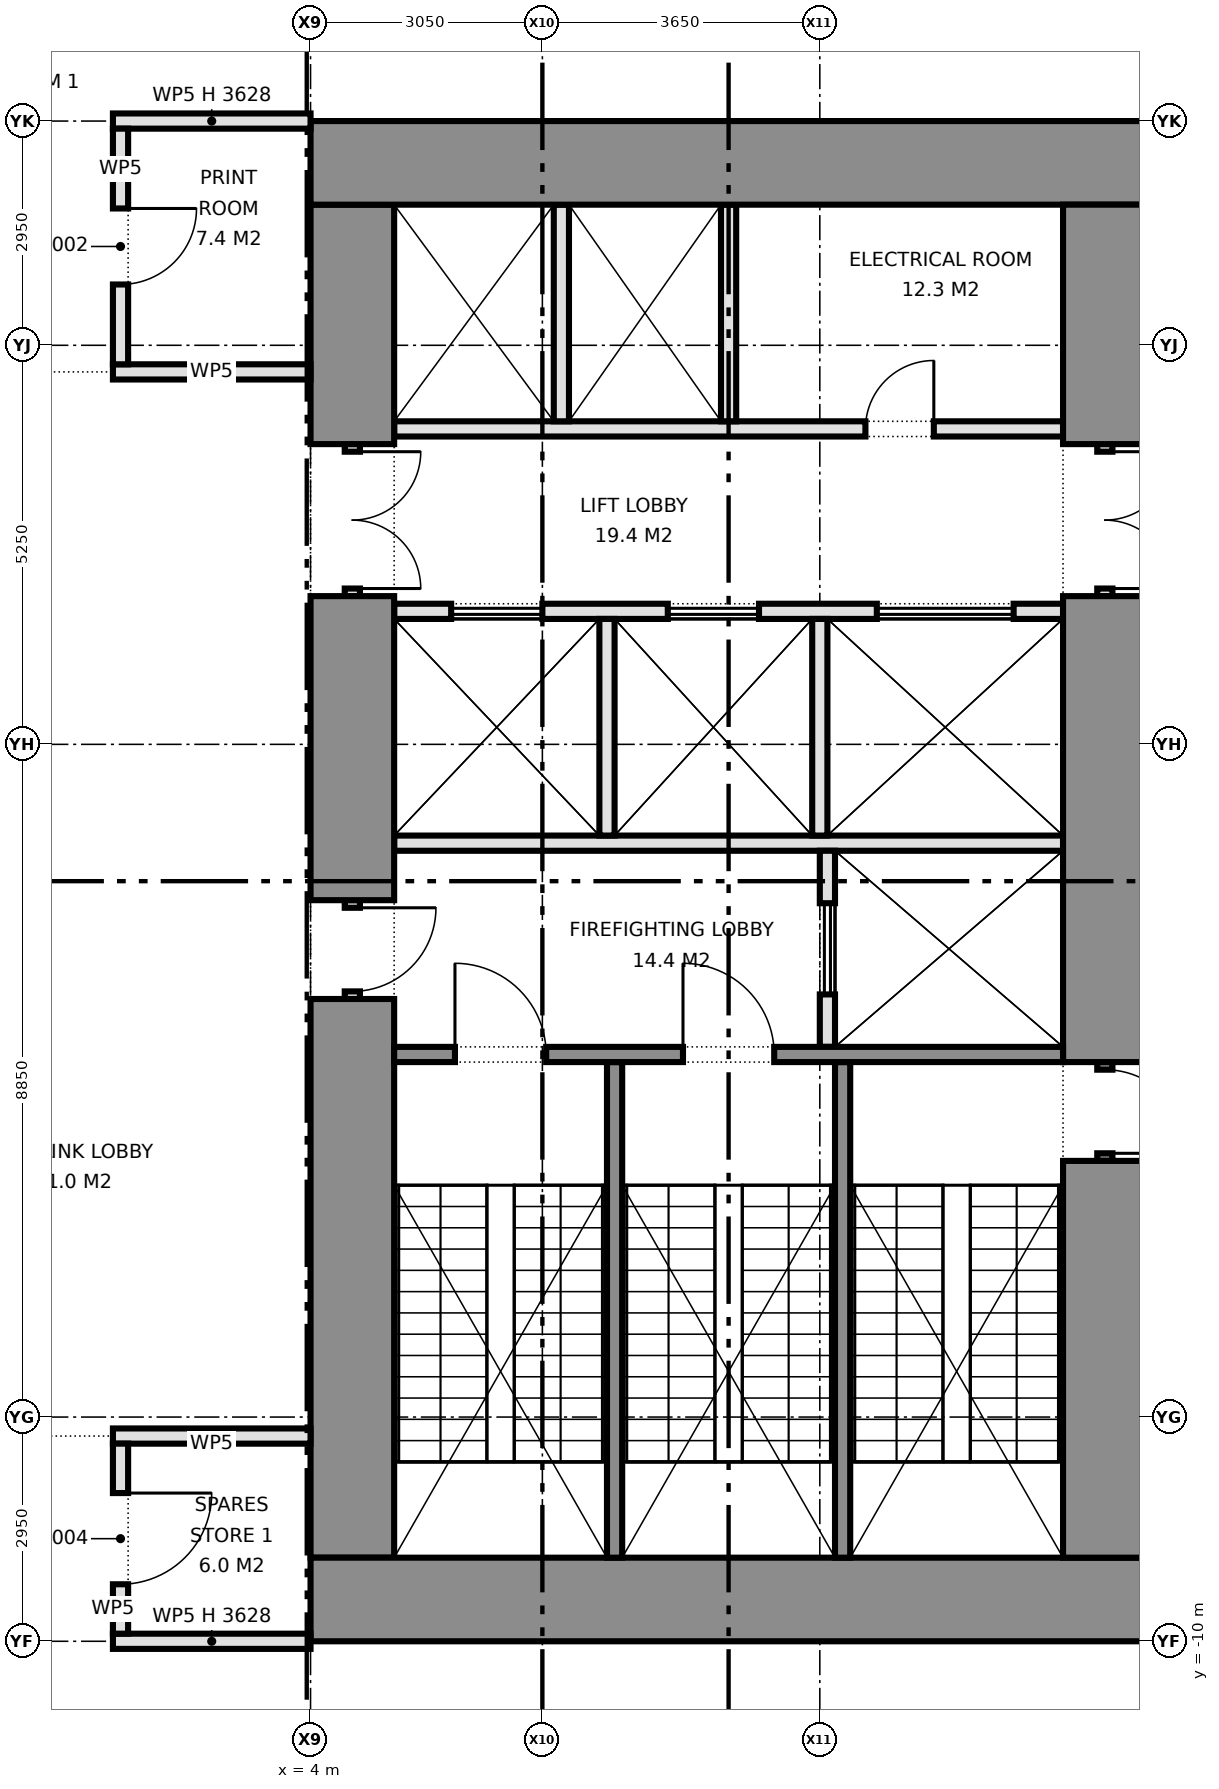
"""IFC4 building model, lengths in metres.
Left out: names, types, materials, properties, quantities, classifications, styles, units other than length and angle.
Written with IfcOpenShell. Run it as: python <this file> out.ifc"""

import sys

from ifc_helpers import new_model, si_unit, direction, frame, frame_2d, origin, place, context, subcontext, project, spatial, rectangle, extrude, element, fill, save


model = new_model("IFC4")
c1 = context("Model", 3, precision=1e-05, world=origin(), true_north=direction((0.0, 1.0)))
c2 = subcontext(c1, "Body", "Model", "MODEL_VIEW")
j1 = project(units=[si_unit("LENGTHUNIT", "METRE"), si_unit("PLANEANGLEUNIT", "RADIAN")], contexts=[c1])
p1 = place(None, origin())
s1 = spatial("IfcSite", under=j1, at=p1, CompositionType="ELEMENT")
p2 = place(p1, origin())
s2 = spatial("IfcBuilding", under=s1, at=p2, CompositionType="ELEMENT")
p3 = place(p2, frame((0.0, 0.0, 54.5)))
s3 = spatial("IfcBuildingStorey", under=s2, at=p3, CompositionType="ELEMENT", Elevation=54.5)
for number, where, z_axis, x_axis in (
    (1, (15.0, 9.45, 0.0), (0.0, 0.0, 1.0), (-1.0, 0.0, 0.0)),
    (2, (15.0, -9.45, 0.0), (0.0, 0.0, 1.0), (-1.0, 0.0, 0.0)),
):
    element("IfcWall", number, at=place(p3, frame(where, z_axis=z_axis, x_axis=x_axis)), inside=s3, PredefinedType="SHEAR", context=c2, shape_type="SweptSolid", body=[
        extrude(rectangle(XDim=11.0, YDim=1.1, at=frame_2d((5.5, 0.0))), origin(), (0.0, 0.0, 1.0), 4.575),
    ])
p4 = place(p3, frame((14.45, 8.9, 0.0), z_axis=(0.0, 0.0, 1.0), x_axis=(0.0, -1.0, 0.0)))
e3 = element("IfcWall", 3, at=p4, inside=s3, PredefinedType="SHEAR", context=c2, shape_type="SweptSolid", body=[
    extrude(rectangle(XDim=3.15, YDim=1.1, at=frame_2d((1.575, 0.0))), origin(), (0.0, 0.0, 1.0), 4.575),
])
p5 = place(p3, frame((14.45, 5.75, 0.0), z_axis=(0.0, 0.0, 1.0), x_axis=(0.0, -1.0, 0.0)))
e4 = element("IfcWall", 4, at=p5, inside=s3, PredefinedType="PARTITIONING", context=c2, shape_type="SweptSolid", body=[
    extrude(rectangle(XDim=2.0, YDim=0.2, at=frame_2d((1.0, 0.0))), origin(), (0.0, 0.0, 1.0), 2.4),
])
p6 = place(p5, frame((0.1, 0.0, 0.0)))
e5 = element("IfcOpeningElement", 5, at=p6, cuts=e4, PredefinedType="OPENING", context=c2, shape_type="SweptSolid", body=[
    extrude(rectangle(XDim=1.8, YDim=2.1, at=frame_2d((0.9, 1.05))), frame((0.0, 0.11, 0.0), z_axis=(0.0, -1.0, 0.0), x_axis=(1.0, 0.0, 0.0)), (0.0, 0.0, 1.0), 0.22),
])
p7 = place(p3, frame((14.45, 3.75, 0.0), z_axis=(0.0, 0.0, 1.0), x_axis=(0.0, -1.0, 0.0)))
e6 = element("IfcWall", 6, at=p7, inside=s3, PredefinedType="SHEAR", context=c2, shape_type="SweptSolid", body=[
    extrude(rectangle(XDim=6.13, YDim=1.1, at=frame_2d((3.065, 0.0))), origin(), (0.0, 0.0, 1.0), 4.575),
])
p8 = place(p3, frame((14.45, -2.38, 0.0), z_axis=(0.0, 0.0, 1.0), x_axis=(0.0, -1.0, 0.0)))
e7 = element("IfcWall", 7, at=p8, inside=s3, PredefinedType="SHEAR", context=c2, shape_type="SweptSolid", body=[
    extrude(rectangle(XDim=1.3, YDim=0.2, at=frame_2d((0.65, 0.0))), origin(), (0.0, 0.0, 1.0), 2.4),
])
p9 = place(p8, frame((0.1, 0.0, 0.0)))
e8 = element("IfcOpeningElement", 8, at=p9, cuts=e7, PredefinedType="OPENING", context=c2, shape_type="SweptSolid", body=[
    extrude(rectangle(XDim=1.1, YDim=2.1, at=frame_2d((0.55, 1.05))), frame((0.0, 0.11, 0.0), z_axis=(0.0, -1.0, 0.0), x_axis=(1.0, 0.0, 0.0)), (0.0, 0.0, 1.0), 0.22),
])
p10 = place(p3, frame((14.45, -3.68, 0.0), z_axis=(0.0, 0.0, 1.0), x_axis=(0.0, -1.0, 0.0)))
e9 = element("IfcWall", 9, at=p10, inside=s3, PredefinedType="SHEAR", context=c2, shape_type="SweptSolid", body=[
    extrude(rectangle(XDim=5.22, YDim=1.1, at=frame_2d((2.61, 0.0))), origin(), (0.0, 0.0, 1.0), 4.575),
])
p11 = place(p3, frame((4.55, 8.9, 0.0), z_axis=(0.0, 0.0, 1.0), x_axis=(0.0, -1.0, 0.0)))
e10 = element("IfcWall", 10, at=p11, inside=s3, PredefinedType="SHEAR", context=c2, shape_type="SweptSolid", body=[
    extrude(rectangle(XDim=3.15, YDim=1.1, at=frame_2d((1.575, 0.0))), origin(), (0.0, 0.0, 1.0), 4.575),
])
p12 = place(p3, frame((4.55, 5.75, 0.0), z_axis=(0.0, 0.0, 1.0), x_axis=(0.0, -1.0, 0.0)))
e11 = element("IfcWall", 11, at=p12, inside=s3, PredefinedType="PARTITIONING", context=c2, shape_type="SweptSolid", body=[
    extrude(rectangle(XDim=2.0, YDim=0.2, at=frame_2d((1.0, 0.0))), origin(), (0.0, 0.0, 1.0), 2.4),
])
p13 = place(p12, frame((0.1, 0.0, 0.0)))
e12 = element("IfcOpeningElement", 12, at=p13, cuts=e11, PredefinedType="OPENING", context=c2, shape_type="SweptSolid", body=[
    extrude(rectangle(XDim=1.8, YDim=2.1, at=frame_2d((0.9, 1.05))), frame((0.0, 0.11, 0.0), z_axis=(0.0, -1.0, 0.0), x_axis=(1.0, 0.0, 0.0)), (0.0, 0.0, 1.0), 0.22),
])
p14 = place(p3, frame((4.55, 3.75, 0.0), z_axis=(0.0, 0.0, 1.0), x_axis=(0.0, -1.0, 0.0)))
e13 = element("IfcWall", 13, at=p14, inside=s3, PredefinedType="SHEAR", context=c2, shape_type="SweptSolid", body=[
    extrude(rectangle(XDim=4.0, YDim=1.1, at=frame_2d((2.0, 0.0))), origin(), (0.0, 0.0, 1.0), 4.575),
])
p15 = place(p3, frame((4.55, -0.25, 0.0), z_axis=(0.0, 0.0, 1.0), x_axis=(0.0, -1.0, 0.0)))
e14 = element("IfcWall", 14, at=p15, inside=s3, PredefinedType="PARTITIONING", context=c2, shape_type="SweptSolid", body=[
    extrude(rectangle(XDim=1.3, YDim=0.2, at=frame_2d((0.65, 0.0))), origin(), (0.0, 0.0, 1.0), 2.4),
])
p16 = place(p15, frame((0.1, 0.0, 0.0)))
e15 = element("IfcOpeningElement", 15, at=p16, cuts=e14, PredefinedType="OPENING", context=c2, shape_type="SweptSolid", body=[
    extrude(rectangle(XDim=1.1, YDim=2.1, at=frame_2d((0.55, 1.05))), frame((0.0, 0.11, 0.0), z_axis=(0.0, -1.0, 0.0), x_axis=(1.0, 0.0, 0.0)), (0.0, 0.0, 1.0), 0.22),
])
p17 = place(p3, frame((4.55, -1.55, 0.0), z_axis=(0.0, 0.0, 1.0), x_axis=(0.0, -1.0, 0.0)))
e16 = element("IfcWall", 16, at=p17, inside=s3, PredefinedType="SHEAR", context=c2, shape_type="SweptSolid", body=[
    extrude(rectangle(XDim=7.35, YDim=1.1, at=frame_2d((3.675, 0.0))), origin(), (0.0, 0.0, 1.0), 4.575),
])
p18 = place(p3, frame((13.9, 5.95, 0.0), z_axis=(0.0, 0.0, 1.0), x_axis=(-1.0, 0.0, 0.0)))
e17 = element("IfcWall", 17, at=p18, inside=s3, PredefinedType="PARTITIONING", context=c2, shape_type="SweptSolid", body=[
    extrude(rectangle(XDim=8.8, YDim=0.2, at=frame_2d((4.4, 0.0))), origin(), (0.0, 0.0, 1.0), 4.575),
])
p19 = place(p18, frame((1.7, 0.0, 0.0)))
e18 = element("IfcOpeningElement", 18, at=p19, cuts=e17, PredefinedType="OPENING", context=c2, shape_type="SweptSolid", body=[
    extrude(rectangle(XDim=0.9, YDim=2.1, at=frame_2d((0.45, 1.05))), frame((0.0, 0.11, 0.0), z_axis=(0.0, -1.0, 0.0), x_axis=(1.0, 0.0, 0.0)), (0.0, 0.0, 1.0), 0.22),
])
p20 = place(p3, frame((13.9, 3.55, 0.0), z_axis=(0.0, 0.0, 1.0), x_axis=(-1.0, 0.0, 0.0)))
e19 = element("IfcWall", 19, at=p20, inside=s3, PredefinedType="PARTITIONING", context=c2, shape_type="SweptSolid", body=[
    extrude(rectangle(XDim=8.8, YDim=0.2, at=frame_2d((4.4, 0.0))), origin(), (0.0, 0.0, 1.0), 4.575),
])
p21 = place(p20, frame((0.65, 0.0, 0.0)))
e20 = element("IfcOpeningElement", 20, at=p21, cuts=e19, PredefinedType="OPENING", context=c2, shape_type="SweptSolid", body=[
    extrude(rectangle(XDim=1.8, YDim=2.1, at=frame_2d((0.9, 1.05))), frame((0.0, 0.11, 0.0), z_axis=(0.0, -1.0, 0.0), x_axis=(1.0, 0.0, 0.0)), (0.0, 0.0, 1.0), 0.22),
])
p22 = place(p20, frame((4.0, 0.0, 0.0)))
e21 = element("IfcOpeningElement", 21, at=p22, cuts=e19, PredefinedType="OPENING", context=c2, shape_type="SweptSolid", body=[
    extrude(rectangle(XDim=1.2, YDim=2.1, at=frame_2d((0.6, 1.05))), frame((0.0, 0.11, 0.0), z_axis=(0.0, -1.0, 0.0), x_axis=(1.0, 0.0, 0.0)), (0.0, 0.0, 1.0), 0.22),
])
p23 = place(p20, frame((6.85, 0.0, 0.0)))
e22 = element("IfcOpeningElement", 22, at=p23, cuts=e19, PredefinedType="OPENING", context=c2, shape_type="SweptSolid", body=[
    extrude(rectangle(XDim=1.2, YDim=2.1, at=frame_2d((0.6, 1.05))), frame((0.0, 0.11, 0.0), z_axis=(0.0, -1.0, 0.0), x_axis=(1.0, 0.0, 0.0)), (0.0, 0.0, 1.0), 0.22),
])
p24 = place(p3, frame((13.9, 0.5, 0.0), z_axis=(0.0, 0.0, 1.0), x_axis=(-1.0, 0.0, 0.0)))
e23 = element("IfcWall", 23, at=p24, inside=s3, PredefinedType="PARTITIONING", context=c2, shape_type="SweptSolid", body=[
    extrude(rectangle(XDim=8.8, YDim=0.2, at=frame_2d((4.4, 0.0))), origin(), (0.0, 0.0, 1.0), 4.575),
])
p25 = place(p3, frame((10.8, 0.4, 0.0), z_axis=(0.0, 0.0, 1.0), x_axis=(0.0, -1.0, 0.0)))
e24 = element("IfcWall", 24, at=p25, inside=s3, PredefinedType="PARTITIONING", context=c2, shape_type="SweptSolid", body=[
    extrude(rectangle(XDim=2.58, YDim=0.2, at=frame_2d((1.29, 0.0))), origin(), (0.0, 0.0, 1.0), 4.575),
])
p26 = place(p25, frame((0.69, 0.0, 0.0)))
e25 = element("IfcOpeningElement", 25, at=p26, cuts=e24, PredefinedType="OPENING", context=c2, shape_type="SweptSolid", body=[
    extrude(rectangle(XDim=1.2, YDim=2.1, at=frame_2d((0.6, 1.05))), frame((0.0, 0.11, 0.0), z_axis=(0.0, -1.0, 0.0), x_axis=(1.0, 0.0, 0.0)), (0.0, 0.0, 1.0), 0.22),
])
p27 = place(p3, frame((13.9, -2.28, 0.0), z_axis=(0.0, 0.0, 1.0), x_axis=(-1.0, 0.0, 0.0)))
e26 = element("IfcWall", 26, at=p27, inside=s3, PredefinedType="SHEAR", context=c2, shape_type="SweptSolid", body=[
    extrude(rectangle(XDim=8.8, YDim=0.2, at=frame_2d((4.4, 0.0))), origin(), (0.0, 0.0, 1.0), 4.575),
])
p28 = place(p27, frame((3.8, 0.0, 0.0)))
e27 = element("IfcOpeningElement", 27, at=p28, cuts=e26, PredefinedType="OPENING", context=c2, shape_type="SweptSolid", body=[
    extrude(rectangle(XDim=1.2, YDim=2.1, at=frame_2d((0.6, 1.05))), frame((0.0, 0.11, 0.0), z_axis=(0.0, -1.0, 0.0), x_axis=(1.0, 0.0, 0.0)), (0.0, 0.0, 1.0), 0.22),
])
p29 = place(p27, frame((6.8, 0.0, 0.0)))
e28 = element("IfcOpeningElement", 28, at=p29, cuts=e26, PredefinedType="OPENING", context=c2, shape_type="SweptSolid", body=[
    extrude(rectangle(XDim=1.2, YDim=2.1, at=frame_2d((0.6, 1.05))), frame((0.0, 0.11, 0.0), z_axis=(0.0, -1.0, 0.0), x_axis=(1.0, 0.0, 0.0)), (0.0, 0.0, 1.0), 0.22),
])
for number, where, z_axis, x_axis in (
    (29, (11.0, -2.38, 0.0), (0.0, 0.0, 1.0), (0.0, -1.0, 0.0)),
    (30, (8.0, -2.38, 0.0), (0.0, 0.0, 1.0), (0.0, -1.0, 0.0)),
):
    element("IfcWall", number, at=place(p3, frame(where, z_axis=z_axis, x_axis=x_axis)), inside=s3, PredefinedType="SHEAR", context=c2, shape_type="SweptSolid", body=[
        extrude(rectangle(XDim=6.52, YDim=0.2, at=frame_2d((3.26, 0.0))), origin(), (0.0, 0.0, 1.0), 4.575),
    ])
for number, where, z_axis, x_axis in (
    (31, (9.5, 8.9, 0.0), (0.0, 0.0, 1.0), (0.0, -1.0, 0.0)),
    (32, (7.3, 8.9, 0.0), (0.0, 0.0, 1.0), (0.0, -1.0, 0.0)),
    (33, (10.7, 3.45, 0.0), (0.0, 0.0, 1.0), (0.0, -1.0, 0.0)),
    (34, (7.9, 3.45, 0.0), (0.0, 0.0, 1.0), (0.0, -1.0, 0.0)),
):
    element("IfcWall", number, at=place(p3, frame(where, z_axis=z_axis, x_axis=x_axis)), inside=s3, PredefinedType="PARTITIONING", context=c2, shape_type="SweptSolid", body=[
        extrude(rectangle(XDim=2.85, YDim=0.2, at=frame_2d((1.425, 0.0))), origin(), (0.0, 0.0, 1.0), 4.575),
    ])
p30 = place(p3, frame((1.4, -10.0, 0.0), z_axis=(0.0, 0.0, 1.0), x_axis=(1.0, 0.0, 0.0)))
e35 = element("IfcWall", 35, at=p30, inside=s3, PredefinedType="PARTITIONING", context=c2, shape_type="SweptSolid", body=[
    extrude(rectangle(XDim=2.6, YDim=0.2, at=frame_2d((1.3, 0.0))), origin(), (0.0, 0.0, 1.0), 3.628),
])
for number, where, z_axis, x_axis in (
    (36, (1.4, -7.3, 0.0), (0.0, 0.0, 1.0), (1.0, 0.0, 0.0)),
    (37, (1.4, 6.7, 0.0), (0.0, 0.0, 1.0), (1.0, 0.0, 0.0)),
):
    element("IfcWall", number, at=place(p3, frame(where, z_axis=z_axis, x_axis=x_axis)), inside=s3, PredefinedType="PARTITIONING", context=c2, shape_type="SweptSolid", body=[
        extrude(rectangle(XDim=2.6, YDim=0.2, at=frame_2d((1.3, 0.0))), origin(), (0.0, 0.0, 1.0), 4.575),
    ])
p31 = place(p3, frame((1.4, 10.0, 0.0), z_axis=(0.0, 0.0, 1.0), x_axis=(1.0, 0.0, 0.0)))
e38 = element("IfcWall", 38, at=p31, inside=s3, PredefinedType="PARTITIONING", context=c2, shape_type="SweptSolid", body=[
    extrude(rectangle(XDim=2.6, YDim=0.2, at=frame_2d((1.3, 0.0))), origin(), (0.0, 0.0, 1.0), 3.628),
])
p32 = place(p3, frame((1.5, -9.9, 0.0), z_axis=(0.0, 0.0, 1.0), x_axis=(0.0, 1.0, 0.0)))
e39 = element("IfcWall", 39, at=p32, inside=s3, PredefinedType="PARTITIONING", context=c2, shape_type="SweptSolid", body=[
    extrude(rectangle(XDim=2.5, YDim=0.2, at=frame_2d((1.25, 0.0))), origin(), (0.0, 0.0, 1.0), 4.575),
])
p33 = place(p32, frame((0.65, 0.0, 0.0)))
e40 = element("IfcOpeningElement", 40, at=p33, cuts=e39, PredefinedType="OPENING", context=c2, shape_type="SweptSolid", body=[
    extrude(rectangle(XDim=1.2, YDim=2.1, at=frame_2d((0.6, 1.05))), frame((0.0, 0.11, 0.0), z_axis=(0.0, -1.0, 0.0), x_axis=(1.0, 0.0, 0.0)), (0.0, 0.0, 1.0), 0.22),
])
p34 = place(p3, frame((1.5, 6.8, 0.0), z_axis=(0.0, 0.0, 1.0), x_axis=(0.0, 1.0, 0.0)))
e41 = element("IfcWall", 41, at=p34, inside=s3, PredefinedType="PARTITIONING", context=c2, shape_type="SweptSolid", body=[
    extrude(rectangle(XDim=3.1, YDim=0.2, at=frame_2d((1.55, 0.0))), origin(), (0.0, 0.0, 1.0), 4.575),
])
p35 = place(p34, frame((1.05, 0.0, 0.0)))
e42 = element("IfcOpeningElement", 42, at=p35, cuts=e41, PredefinedType="OPENING", context=c2, shape_type="SweptSolid", body=[
    extrude(rectangle(XDim=1.0, YDim=2.1, at=frame_2d((0.5, 1.05))), frame((0.0, 0.11, 0.0), z_axis=(0.0, -1.0, 0.0), x_axis=(1.0, 0.0, 0.0)), (0.0, 0.0, 1.0), 0.22),
])
p36 = place(p6, origin())
e43 = element("IfcDoor", 43, at=p36, inside=s3, OperationType="DOUBLE_DOOR_SINGLE_SWING", PredefinedType="DOOR", context=c2, shape_type="SweptSolid", body=[
    extrude(rectangle(XDim=1.8, YDim=2.1, at=frame_2d((0.9, 1.05))), frame((0.0, 0.025, 0.0), z_axis=(0.0, -1.0, 0.0), x_axis=(1.0, 0.0, 0.0)), (0.0, 0.0, 1.0), 0.05),
])
fill(e5, e43)
p37 = place(p9, origin())
e44 = element("IfcDoor", 44, at=p37, inside=s3, OperationType="SINGLE_SWING_RIGHT", PredefinedType="DOOR", context=c2, shape_type="SweptSolid", body=[
    extrude(rectangle(XDim=1.1, YDim=2.1, at=frame_2d((0.55, 1.05))), frame((0.0, 0.025, 0.0), z_axis=(0.0, -1.0, 0.0), x_axis=(1.0, 0.0, 0.0)), (0.0, 0.0, 1.0), 0.05),
])
fill(e8, e44)
p38 = place(p13, origin())
e45 = element("IfcDoor", 45, at=p38, inside=s3, OperationType="DOUBLE_DOOR_SINGLE_SWING", PredefinedType="DOOR", context=c2, shape_type="SweptSolid", body=[
    extrude(rectangle(XDim=1.8, YDim=2.1, at=frame_2d((0.9, 1.05))), frame((0.0, 0.025, 0.0), z_axis=(0.0, -1.0, 0.0), x_axis=(1.0, 0.0, 0.0)), (0.0, 0.0, 1.0), 0.05),
])
fill(e12, e45)
p39 = place(p16, origin())
e46 = element("IfcDoor", 46, at=p39, inside=s3, OperationType="SINGLE_SWING_LEFT", PredefinedType="DOOR", context=c2, shape_type="SweptSolid", body=[
    extrude(rectangle(XDim=1.1, YDim=2.1, at=frame_2d((0.55, 1.05))), frame((0.0, 0.025, 0.0), z_axis=(0.0, -1.0, 0.0), x_axis=(1.0, 0.0, 0.0)), (0.0, 0.0, 1.0), 0.05),
])
fill(e15, e46)
p40 = place(p21, origin())
e47 = element("IfcDoor", 47, at=p40, inside=s3, OperationType="DOUBLE_DOOR_SLIDING", PredefinedType="DOOR", context=c2, shape_type="SweptSolid", body=[
    extrude(rectangle(XDim=1.8, YDim=2.1, at=frame_2d((0.9, 1.05))), frame((0.0, 0.025, 0.0), z_axis=(0.0, -1.0, 0.0), x_axis=(1.0, 0.0, 0.0)), (0.0, 0.0, 1.0), 0.05),
])
fill(e20, e47)
p41 = place(p22, origin())
e48 = element("IfcDoor", 48, at=p41, inside=s3, OperationType="DOUBLE_DOOR_SLIDING", PredefinedType="DOOR", context=c2, shape_type="SweptSolid", body=[
    extrude(rectangle(XDim=1.2, YDim=2.1, at=frame_2d((0.6, 1.05))), frame((0.0, 0.025, 0.0), z_axis=(0.0, -1.0, 0.0), x_axis=(1.0, 0.0, 0.0)), (0.0, 0.0, 1.0), 0.05),
])
fill(e21, e48)
p42 = place(p23, origin())
e49 = element("IfcDoor", 49, at=p42, inside=s3, OperationType="DOUBLE_DOOR_SLIDING", PredefinedType="DOOR", context=c2, shape_type="SweptSolid", body=[
    extrude(rectangle(XDim=1.2, YDim=2.1, at=frame_2d((0.6, 1.05))), frame((0.0, 0.025, 0.0), z_axis=(0.0, -1.0, 0.0), x_axis=(1.0, 0.0, 0.0)), (0.0, 0.0, 1.0), 0.05),
])
fill(e22, e49)
p43 = place(p26, origin())
e50 = element("IfcDoor", 50, at=p43, inside=s3, OperationType="DOUBLE_DOOR_SLIDING", PredefinedType="DOOR", context=c2, shape_type="SweptSolid", body=[
    extrude(rectangle(XDim=1.2, YDim=2.1, at=frame_2d((0.6, 1.05))), frame((0.0, 0.025, 0.0), z_axis=(0.0, -1.0, 0.0), x_axis=(1.0, 0.0, 0.0)), (0.0, 0.0, 1.0), 0.05),
])
fill(e25, e50)
p44 = place(p19, frame((0.9, 0.0, 0.0), z_axis=(0.0, 0.0, 1.0), x_axis=(-1.0, 0.0, 0.0)))
e51 = element("IfcDoor", 51, at=p44, inside=s3, OperationType="SINGLE_SWING_RIGHT", PredefinedType="DOOR", context=c2, shape_type="SweptSolid", body=[
    extrude(rectangle(XDim=0.9, YDim=2.1, at=frame_2d((0.45, 1.05))), frame((0.0, 0.025, 0.0), z_axis=(0.0, -1.0, 0.0), x_axis=(1.0, 0.0, 0.0)), (0.0, 0.0, 1.0), 0.05),
])
fill(e18, e51)
p45 = place(p28, frame((1.2, 0.0, 0.0), z_axis=(0.0, 0.0, 1.0), x_axis=(-1.0, 0.0, 0.0)))
e52 = element("IfcDoor", 52, at=p45, inside=s3, OperationType="SINGLE_SWING_LEFT", PredefinedType="DOOR", context=c2, shape_type="SweptSolid", body=[
    extrude(rectangle(XDim=1.2, YDim=2.1, at=frame_2d((0.6, 1.05))), frame((0.0, 0.025, 0.0), z_axis=(0.0, -1.0, 0.0), x_axis=(1.0, 0.0, 0.0)), (0.0, 0.0, 1.0), 0.05),
])
fill(e27, e52)
p46 = place(p29, frame((1.2, 0.0, 0.0), z_axis=(0.0, 0.0, 1.0), x_axis=(-1.0, 0.0, 0.0)))
e53 = element("IfcDoor", 53, at=p46, inside=s3, OperationType="SINGLE_SWING_LEFT", PredefinedType="DOOR", context=c2, shape_type="SweptSolid", body=[
    extrude(rectangle(XDim=1.2, YDim=2.1, at=frame_2d((0.6, 1.05))), frame((0.0, 0.025, 0.0), z_axis=(0.0, -1.0, 0.0), x_axis=(1.0, 0.0, 0.0)), (0.0, 0.0, 1.0), 0.05),
])
fill(e28, e53)
p47 = place(p35, frame((1.0, 0.0, 0.0), z_axis=(0.0, 0.0, 1.0), x_axis=(-1.0, 0.0, 0.0)))
e54 = element("IfcDoor", 54, at=p47, inside=s3, OperationType="SINGLE_SWING_LEFT", PredefinedType="DOOR", context=c2, shape_type="SweptSolid", body=[
    extrude(rectangle(XDim=1.0, YDim=2.1, at=frame_2d((0.5, 1.05))), frame((0.0, 0.025, 0.0), z_axis=(0.0, -1.0, 0.0), x_axis=(1.0, 0.0, 0.0)), (0.0, 0.0, 1.0), 0.05),
])
fill(e42, e54)
p48 = place(p33, frame((1.2, 0.0, 0.0), z_axis=(0.0, 0.0, 1.0), x_axis=(-1.0, 0.0, 0.0)))
e55 = element("IfcDoor", 55, at=p48, inside=s3, OperationType="SINGLE_SWING_LEFT", PredefinedType="DOOR", context=c2, shape_type="SweptSolid", body=[
    extrude(rectangle(XDim=1.2, YDim=2.1, at=frame_2d((0.6, 1.05))), frame((0.0, 0.025, 0.0), z_axis=(0.0, -1.0, 0.0), x_axis=(1.0, 0.0, 0.0)), (0.0, 0.0, 1.0), 0.05),
])
fill(e40, e55)
save(model, sys.argv[1])
